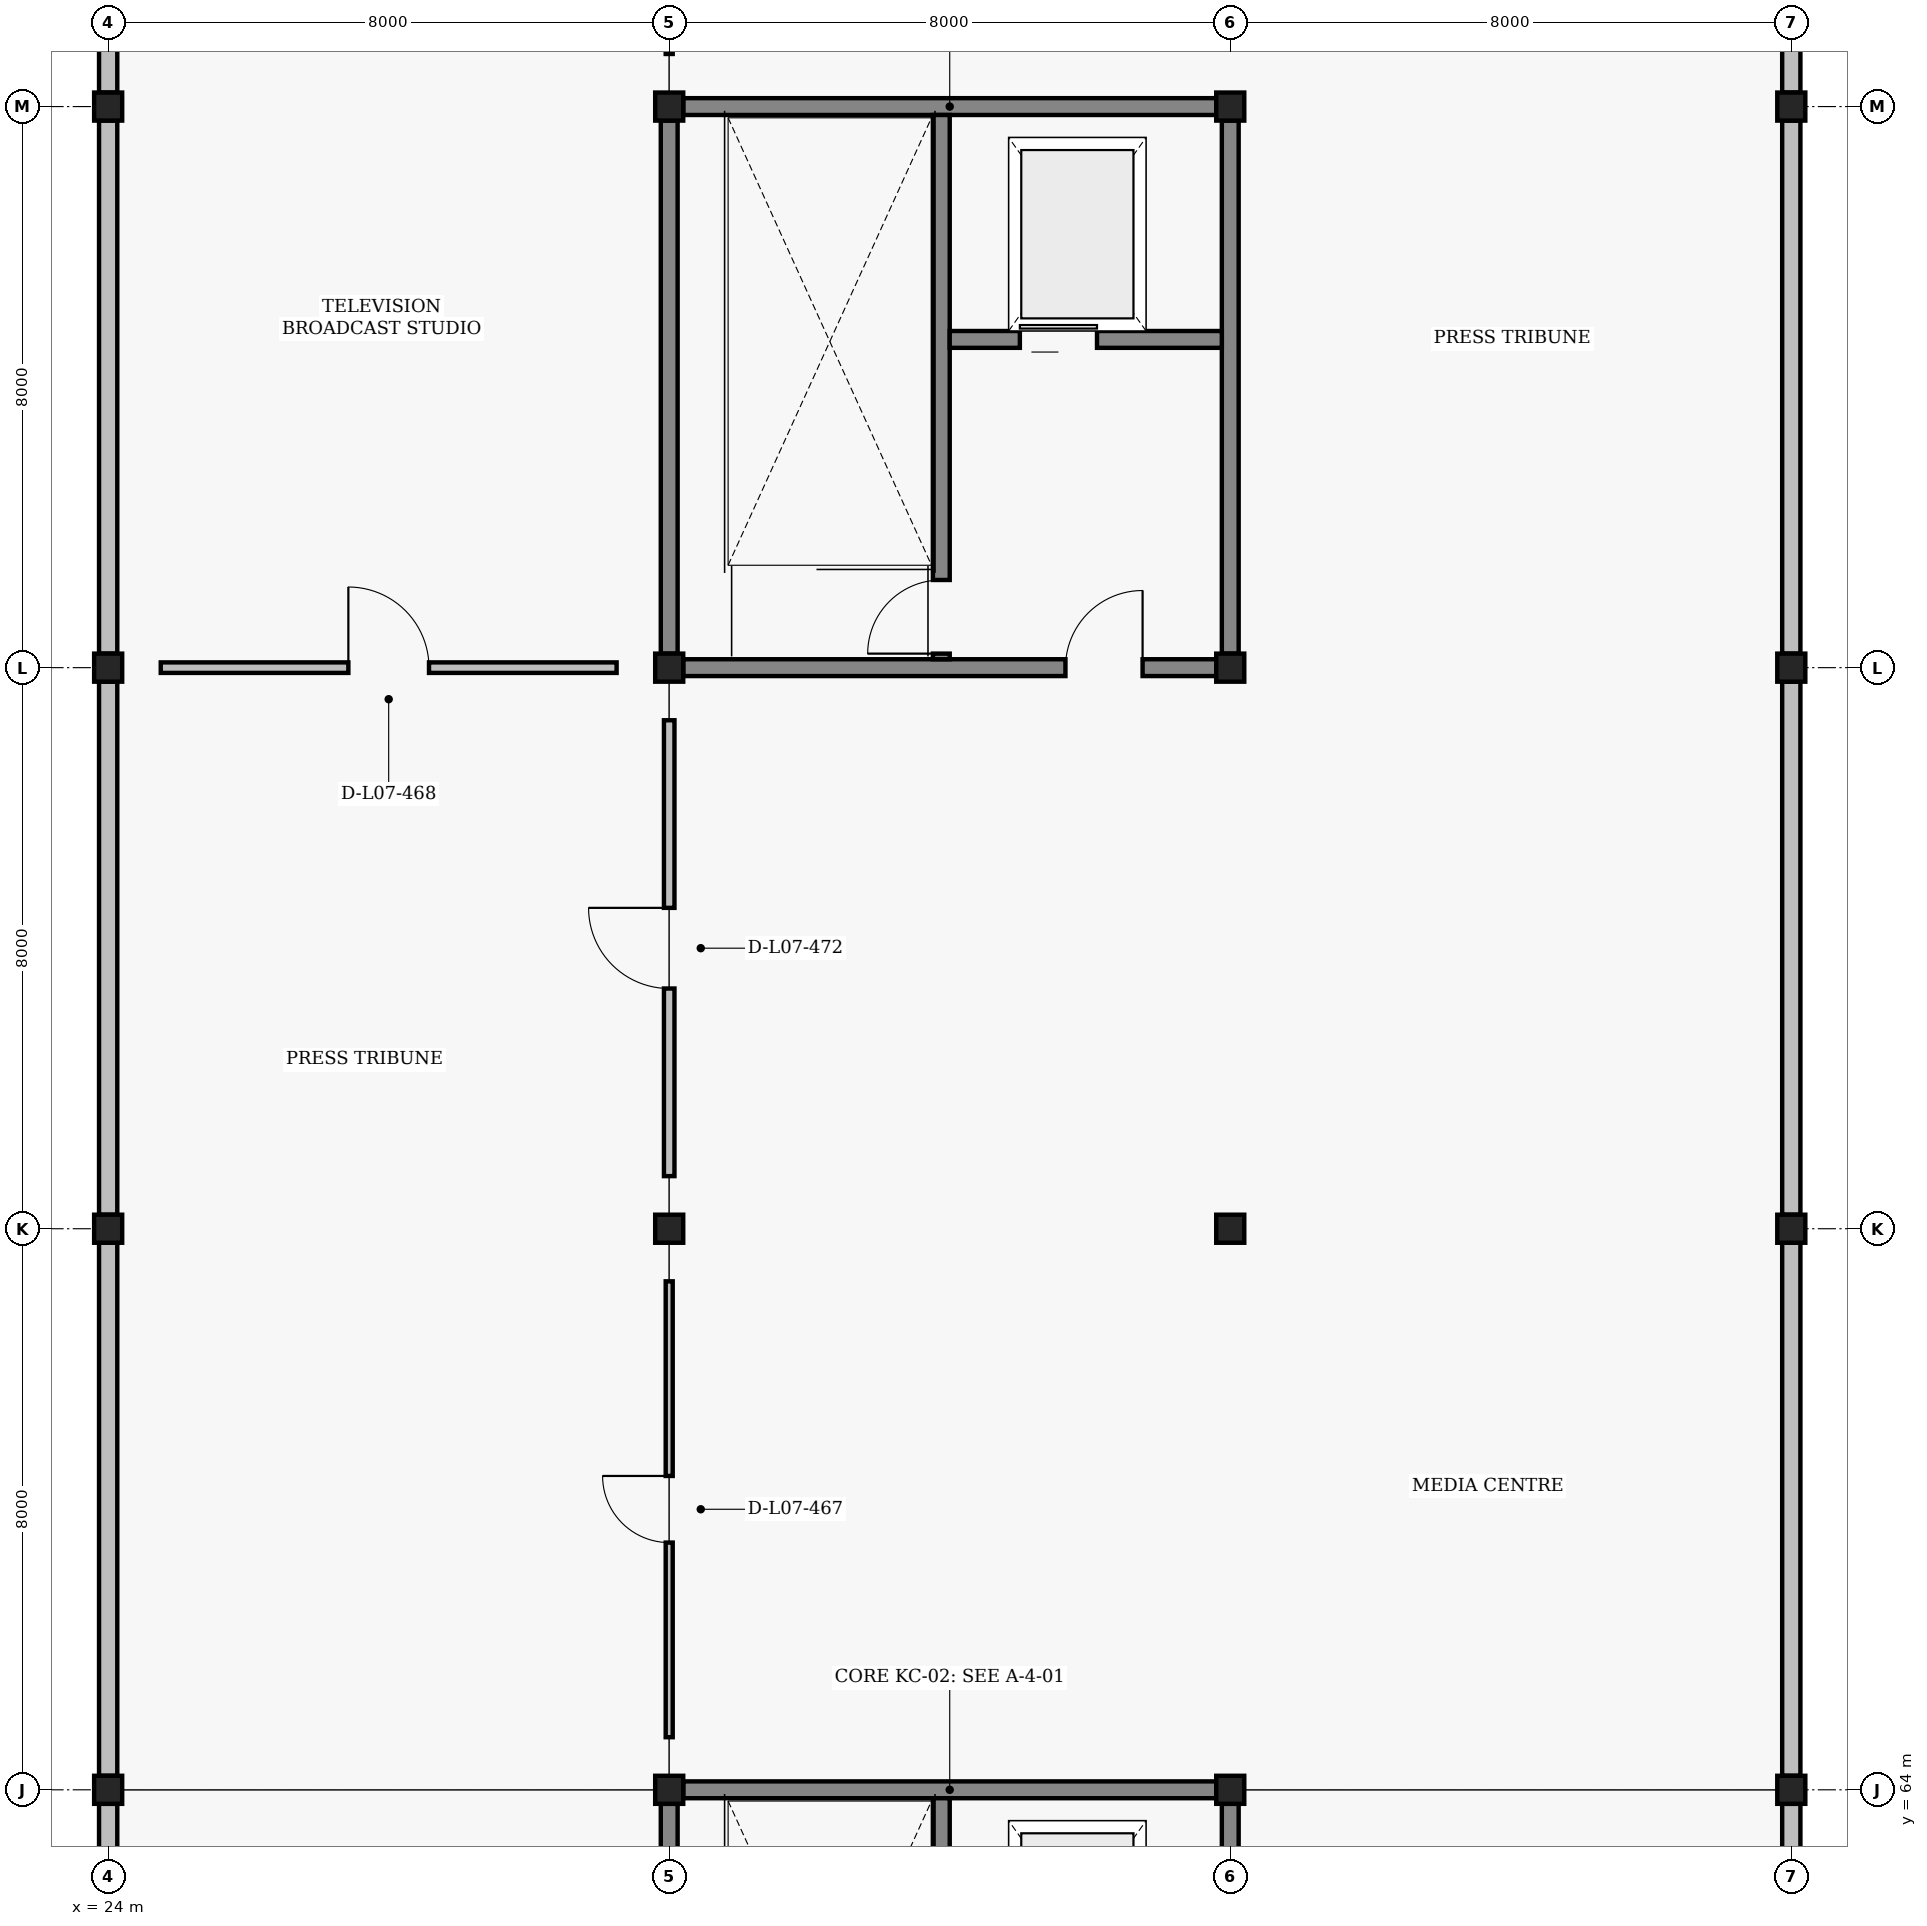
"""IFC4 building model, lengths in metres.
Left out: names, types, materials, properties, quantities, classifications, styles, units other than length and angle.
Written with IfcOpenShell. Run it as: python <this file> out.ifc"""

import sys

from ifc_helpers import new_model, si_unit, direction, frame, frame_2d, origin, origin_2d, place, context, subcontext, project, spatial, rectangle, i_section, extrude, element, fill, save


model = new_model("IFC4")
c1 = context("Model", 3, precision=1e-05, world=origin(), true_north=direction((0.0, 1.0)))
c2 = subcontext(c1, "Body", "Model", "MODEL_VIEW")
j1 = project(units=[si_unit("LENGTHUNIT", "METRE"), si_unit("PLANEANGLEUNIT", "RADIAN")], contexts=[c1])
p1 = place(None, origin())
s1 = spatial("IfcSite", under=j1, at=p1, CompositionType="ELEMENT")
p2 = place(p1, origin())
s2 = spatial("IfcBuilding", under=s1, at=p2, CompositionType="ELEMENT")
p3 = place(p2, frame((0.0, 0.0, 27.0)))
s3 = spatial("IfcBuildingStorey", under=s2, at=p3, CompositionType="ELEMENT", Elevation=27.0)
for number, where, z_axis, x_axis in (
    (1, (24.0, 64.0, 0.0), (0.0, 0.0, 1.0), (1.0, 0.0, 0.0)),
    (2, (24.0, 72.0, 0.0), (0.0, 0.0, 1.0), (1.0, 0.0, 0.0)),
    (3, (24.0, 80.0, 0.0), (0.0, 0.0, 1.0), (1.0, 0.0, 0.0)),
    (4, (24.0, 88.0, 0.0), (0.0, 0.0, 1.0), (1.0, 0.0, 0.0)),
    (5, (32.0, 64.0, 0.0), (0.0, 0.0, 1.0), (1.0, 0.0, 0.0)),
    (6, (32.0, 72.0, 0.0), (0.0, 0.0, 1.0), (1.0, 0.0, 0.0)),
    (7, (32.0, 80.0, 0.0), (0.0, 0.0, 1.0), (1.0, 0.0, 0.0)),
    (8, (32.0, 88.0, 0.0), (0.0, 0.0, 1.0), (1.0, 0.0, 0.0)),
    (9, (40.0, 64.0, 0.0), (0.0, 0.0, 1.0), (1.0, 0.0, 0.0)),
    (10, (40.0, 72.0, 0.0), (0.0, 0.0, 1.0), (1.0, 0.0, 0.0)),
    (11, (40.0, 80.0, 0.0), (0.0, 0.0, 1.0), (1.0, 0.0, 0.0)),
    (12, (40.0, 88.0, 0.0), (0.0, 0.0, 1.0), (1.0, 0.0, 0.0)),
    (13, (48.0, 64.0, 0.0), (0.0, 0.0, 1.0), (1.0, 0.0, 0.0)),
    (14, (48.0, 72.0, 0.0), (0.0, 0.0, 1.0), (1.0, 0.0, 0.0)),
    (15, (48.0, 80.0, 0.0), (0.0, 0.0, 1.0), (1.0, 0.0, 0.0)),
    (16, (48.0, 88.0, 0.0), (0.0, 0.0, 1.0), (1.0, 0.0, 0.0)),
):
    element("IfcColumn", number, at=place(p3, frame(where, z_axis=z_axis, x_axis=x_axis)), inside=s3, PredefinedType="COLUMN", context=c2, shape_type="SweptSolid", body=[
        extrude(i_section(OverallWidth=0.4, OverallDepth=0.4, WebThickness=0.013, FlangeThickness=0.021, at=origin_2d()), origin(), (0.0, 0.0, 1.0), 4.2),
    ])
for number, where, z_axis, x_axis in (
    (17, (24.0, 56.2, 0.0), (0.0, 0.0, 1.0), (0.0, 1.0, 0.0)),
    (18, (24.0, 64.2, 0.0), (0.0, 0.0, 1.0), (0.0, 1.0, 0.0)),
    (19, (24.0, 72.2, 0.0), (0.0, 0.0, 1.0), (0.0, 1.0, 0.0)),
    (20, (24.0, 80.2, 0.0), (0.0, 0.0, 1.0), (0.0, 1.0, 0.0)),
    (21, (24.0, 88.2, 0.0), (0.0, 0.0, 1.0), (0.0, 1.0, 0.0)),
    (22, (48.0, 56.2, 0.0), (0.0, 0.0, 1.0), (0.0, 1.0, 0.0)),
    (23, (48.0, 64.2, 0.0), (0.0, 0.0, 1.0), (0.0, 1.0, 0.0)),
    (24, (48.0, 72.2, 0.0), (0.0, 0.0, 1.0), (0.0, 1.0, 0.0)),
    (25, (48.0, 80.2, 0.0), (0.0, 0.0, 1.0), (0.0, 1.0, 0.0)),
    (26, (48.0, 88.2, 0.0), (0.0, 0.0, 1.0), (0.0, 1.0, 0.0)),
):
    element("IfcWall", number, at=place(p3, frame(where, z_axis=z_axis, x_axis=x_axis)), inside=s3, PredefinedType="SOLIDWALL", context=c2, shape_type="SweptSolid", body=[
        extrude(rectangle(XDim=7.6, YDim=0.26, at=frame_2d((3.8, 0.0))), origin(), (0.0, 0.0, 1.0), 3.35),
    ])
for number, where, z_axis, x_axis in (
    (27, (32.2, 64.0, 0.0), (0.0, 0.0, 1.0), (1.0, 0.0, 0.0)),
    (28, (32.0, 56.2, 0.0), (0.0, 0.0, 1.0), (0.0, 1.0, 0.0)),
    (29, (40.0, 56.2, 0.0), (0.0, 0.0, 1.0), (0.0, 1.0, 0.0)),
):
    element("IfcWall", number, at=place(p3, frame(where, z_axis=z_axis, x_axis=x_axis)), inside=s3, PredefinedType="SHEAR", context=c2, shape_type="SweptSolid", body=[
        extrude(rectangle(XDim=7.6, YDim=0.24, at=frame_2d((3.8, 0.0))), origin(), (0.0, 0.0, 1.0), 3.37),
    ])
p4 = place(p3, frame((35.88, 56.12, 0.0), z_axis=(0.0, 0.0, 1.0), x_axis=(0.0, 1.0, 0.0)))
e30 = element("IfcWall", 30, at=p4, inside=s3, PredefinedType="SHEAR", context=c2, shape_type="SweptSolid", body=[
    extrude(rectangle(XDim=7.76, YDim=0.24, at=frame_2d((3.88, 0.0))), origin(), (0.0, 0.0, 1.0), 3.47),
])
p5 = place(p4, frame((0.08, 0.0, 0.0)))
e31 = element("IfcOpeningElement", 31, at=p5, cuts=e30, PredefinedType="OPENING", context=c2, shape_type="SweptSolid", body=[
    extrude(rectangle(XDim=1.05, YDim=2.15, at=frame_2d((0.525, 1.075))), frame((0.0, 0.13, 0.0), z_axis=(0.0, -1.0, 0.0), x_axis=(1.0, 0.0, 0.0)), (0.0, 0.0, 1.0), 0.26),
])
p6 = place(p3, frame((32.2, 80.0, 0.0), z_axis=(0.0, 0.0, 1.0), x_axis=(1.0, 0.0, 0.0)))
e32 = element("IfcWall", 32, at=p6, inside=s3, PredefinedType="SHEAR", context=c2, shape_type="SweptSolid", body=[
    extrude(rectangle(XDim=7.6, YDim=0.24, at=frame_2d((3.8, 0.0))), origin(), (0.0, 0.0, 1.0), 3.37),
])
p7 = place(p6, frame((5.45, 0.0, 0.0)))
e33 = element("IfcOpeningElement", 33, at=p7, cuts=e32, PredefinedType="OPENING", context=c2, shape_type="SweptSolid", body=[
    extrude(rectangle(XDim=1.1, YDim=2.2, at=frame_2d((0.55, 1.1))), frame((0.0, 0.13, 0.0), z_axis=(0.0, -1.0, 0.0), x_axis=(1.0, 0.0, 0.0)), (0.0, 0.0, 1.0), 0.26),
])
for number, where, z_axis, x_axis in (
    (34, (32.2, 88.0, 0.0), (0.0, 0.0, 1.0), (1.0, 0.0, 0.0)),
    (35, (32.0, 80.2, 0.0), (0.0, 0.0, 1.0), (0.0, 1.0, 0.0)),
    (36, (40.0, 80.2, 0.0), (0.0, 0.0, 1.0), (0.0, 1.0, 0.0)),
):
    element("IfcWall", number, at=place(p3, frame(where, z_axis=z_axis, x_axis=x_axis)), inside=s3, PredefinedType="SHEAR", context=c2, shape_type="SweptSolid", body=[
        extrude(rectangle(XDim=7.6, YDim=0.24, at=frame_2d((3.8, 0.0))), origin(), (0.0, 0.0, 1.0), 3.37),
    ])
p8 = place(p3, frame((35.88, 80.12, 0.0), z_axis=(0.0, 0.0, 1.0), x_axis=(0.0, 1.0, 0.0)))
e37 = element("IfcWall", 37, at=p8, inside=s3, PredefinedType="SHEAR", context=c2, shape_type="SweptSolid", body=[
    extrude(rectangle(XDim=7.76, YDim=0.24, at=frame_2d((3.88, 0.0))), origin(), (0.0, 0.0, 1.0), 3.47),
])
p9 = place(p8, frame((0.08, 0.0, 0.0)))
e38 = element("IfcOpeningElement", 38, at=p9, cuts=e37, PredefinedType="OPENING", context=c2, shape_type="SweptSolid", body=[
    extrude(rectangle(XDim=1.05, YDim=2.15, at=frame_2d((0.525, 1.075))), frame((0.0, 0.13, 0.0), z_axis=(0.0, -1.0, 0.0), x_axis=(1.0, 0.0, 0.0)), (0.0, 0.0, 1.0), 0.26),
])
p10 = place(p3, frame((36.0, 84.68, 0.0), z_axis=(0.0, 0.0, 1.0), x_axis=(1.0, 0.0, 0.0)))
e39 = element("IfcWall", 39, at=p10, inside=s3, PredefinedType="SHEAR", context=c2, shape_type="SweptSolid", body=[
    extrude(rectangle(XDim=3.88, YDim=0.24, at=frame_2d((1.94, 0.0))), origin(), (0.0, 0.0, 1.0), 3.37),
])
p11 = place(p10, frame((1.0, 0.0, 0.0)))
e40 = element("IfcOpeningElement", 40, at=p11, cuts=e39, PredefinedType="OPENING", context=c2, shape_type="SweptSolid", body=[
    extrude(rectangle(XDim=1.1, YDim=2.15, at=frame_2d((0.55, 1.075))), frame((0.0, 0.13, 0.0), z_axis=(0.0, -1.0, 0.0), x_axis=(1.0, 0.0, 0.0)), (0.0, 0.0, 1.0), 0.26),
])
p12 = place(p3, frame((32.0, 64.75, 0.0), z_axis=(0.0, 0.0, 1.0), x_axis=(0.0, 1.0, 0.0)))
e41 = element("IfcWall", 41, at=p12, inside=s3, PredefinedType="PARTITIONING", context=c2, shape_type="SweptSolid", body=[
    extrude(rectangle(XDim=6.5, YDim=0.1, at=frame_2d((3.25, 0.0))), origin(), (0.0, 0.0, 1.0), 3.37),
])
p13 = place(p12, frame((2.775, 0.0, 0.0)))
e42 = element("IfcOpeningElement", 42, at=p13, cuts=e41, PredefinedType="OPENING", context=c2, shape_type="SweptSolid", body=[
    extrude(rectangle(XDim=0.95, YDim=2.1, at=frame_2d((0.475, 1.05))), frame((0.0, 0.06, 0.0), z_axis=(0.0, -1.0, 0.0), x_axis=(1.0, 0.0, 0.0)), (0.0, 0.0, 1.0), 0.12),
])
p14 = place(p3, frame((24.75, 80.0, 0.0), z_axis=(0.0, 0.0, 1.0), x_axis=(1.0, 0.0, 0.0)))
e43 = element("IfcWall", 43, at=p14, inside=s3, PredefinedType="PARTITIONING", context=c2, shape_type="SweptSolid", body=[
    extrude(rectangle(XDim=6.5, YDim=0.15, at=frame_2d((3.25, 0.0))), origin(), (0.0, 0.0, 1.0), 3.47),
])
p15 = place(p14, frame((2.675, 0.0, 0.0)))
e44 = element("IfcOpeningElement", 44, at=p15, cuts=e43, PredefinedType="OPENING", context=c2, shape_type="SweptSolid", body=[
    extrude(rectangle(XDim=1.15, YDim=2.15, at=frame_2d((0.575, 1.075))), frame((0.0, 0.085, 0.0), z_axis=(0.0, -1.0, 0.0), x_axis=(1.0, 0.0, 0.0)), (0.0, 0.0, 1.0), 0.17),
])
p16 = place(p3, frame((32.0, 72.75, 0.0), z_axis=(0.0, 0.0, 1.0), x_axis=(0.0, 1.0, 0.0)))
e45 = element("IfcWall", 45, at=p16, inside=s3, PredefinedType="PARTITIONING", context=c2, shape_type="SweptSolid", body=[
    extrude(rectangle(XDim=6.5, YDim=0.15, at=frame_2d((3.25, 0.0))), origin(), (0.0, 0.0, 1.0), 3.37),
])
p17 = place(p16, frame((2.675, 0.0, 0.0)))
e46 = element("IfcOpeningElement", 46, at=p17, cuts=e45, PredefinedType="OPENING", context=c2, shape_type="SweptSolid", body=[
    extrude(rectangle(XDim=1.15, YDim=2.15, at=frame_2d((0.575, 1.075))), frame((0.0, 0.085, 0.0), z_axis=(0.0, -1.0, 0.0), x_axis=(1.0, 0.0, 0.0)), (0.0, 0.0, 1.0), 0.17),
])
p18 = place(p3, frame((32.0, 88.75, 0.0), z_axis=(0.0, 0.0, 1.0), x_axis=(0.0, 1.0, 0.0)))
e47 = element("IfcWall", 47, at=p18, inside=s3, PredefinedType="PARTITIONING", context=c2, shape_type="SweptSolid", body=[
    extrude(rectangle(XDim=6.5, YDim=0.1, at=frame_2d((3.25, 0.0))), origin(), (0.0, 0.0, 1.0), 3.37),
])
p19 = place(p18, frame((2.775, 0.0, 0.0)))
e48 = element("IfcOpeningElement", 48, at=p19, cuts=e47, PredefinedType="OPENING", context=c2, shape_type="SweptSolid", body=[
    extrude(rectangle(XDim=0.95, YDim=2.1, at=frame_2d((0.475, 1.05))), frame((0.0, 0.06, 0.0), z_axis=(0.0, -1.0, 0.0), x_axis=(1.0, 0.0, 0.0)), (0.0, 0.0, 1.0), 0.12),
])
p20 = place(p7, origin())
e49 = element("IfcDoor", 49, at=p20, inside=s3, OperationType="SINGLE_SWING_RIGHT", PredefinedType="DOOR", context=c2, shape_type="SweptSolid", body=[
    extrude(rectangle(XDim=1.1, YDim=2.2, at=frame_2d((0.55, 1.1))), frame((0.0, 0.025, 0.0), z_axis=(0.0, -1.0, 0.0), x_axis=(1.0, 0.0, 0.0)), (0.0, 0.0, 1.0), 0.05),
])
fill(e33, e49)
p21 = place(p9, origin())
e50 = element("IfcDoor", 50, at=p21, inside=s3, OperationType="SINGLE_SWING_LEFT", PredefinedType="DOOR", context=c2, shape_type="SweptSolid", body=[
    extrude(rectangle(XDim=1.05, YDim=2.15, at=frame_2d((0.525, 1.075))), frame((0.0, 0.025, 0.0), z_axis=(0.0, -1.0, 0.0), x_axis=(1.0, 0.0, 0.0)), (0.0, 0.0, 1.0), 0.05),
])
fill(e38, e50)
p22 = place(p11, origin())
e51 = element("IfcDoor", 51, at=p22, inside=s3, OperationType="SLIDING_TO_LEFT", PredefinedType="DOOR", context=c2, shape_type="SweptSolid", body=[
    extrude(rectangle(XDim=1.1, YDim=2.15, at=frame_2d((0.55, 1.075))), frame((0.0, 0.025, 0.0), z_axis=(0.0, -1.0, 0.0), x_axis=(1.0, 0.0, 0.0)), (0.0, 0.0, 1.0), 0.05),
])
fill(e40, e51)
p23 = place(p13, origin())
e52 = element("IfcDoor", 52, at=p23, inside=s3, OperationType="SINGLE_SWING_RIGHT", PredefinedType="DOOR", context=c2, shape_type="SweptSolid", body=[
    extrude(rectangle(XDim=0.95, YDim=2.1, at=frame_2d((0.475, 1.05))), frame((0.0, 0.025, 0.0), z_axis=(0.0, -1.0, 0.0), x_axis=(1.0, 0.0, 0.0)), (0.0, 0.0, 1.0), 0.05),
])
fill(e42, e52)
p24 = place(p15, origin())
e53 = element("IfcDoor", 53, at=p24, inside=s3, OperationType="SINGLE_SWING_LEFT", PredefinedType="DOOR", context=c2, shape_type="SweptSolid", body=[
    extrude(rectangle(XDim=1.15, YDim=2.15, at=frame_2d((0.575, 1.075))), frame((0.0, 0.025, 0.0), z_axis=(0.0, -1.0, 0.0), x_axis=(1.0, 0.0, 0.0)), (0.0, 0.0, 1.0), 0.05),
])
fill(e44, e53)
p25 = place(p17, origin())
e54 = element("IfcDoor", 54, at=p25, inside=s3, OperationType="SINGLE_SWING_RIGHT", PredefinedType="DOOR", context=c2, shape_type="SweptSolid", body=[
    extrude(rectangle(XDim=1.15, YDim=2.15, at=frame_2d((0.575, 1.075))), frame((0.0, 0.025, 0.0), z_axis=(0.0, -1.0, 0.0), x_axis=(1.0, 0.0, 0.0)), (0.0, 0.0, 1.0), 0.05),
])
fill(e46, e54)
save(model, sys.argv[1])
